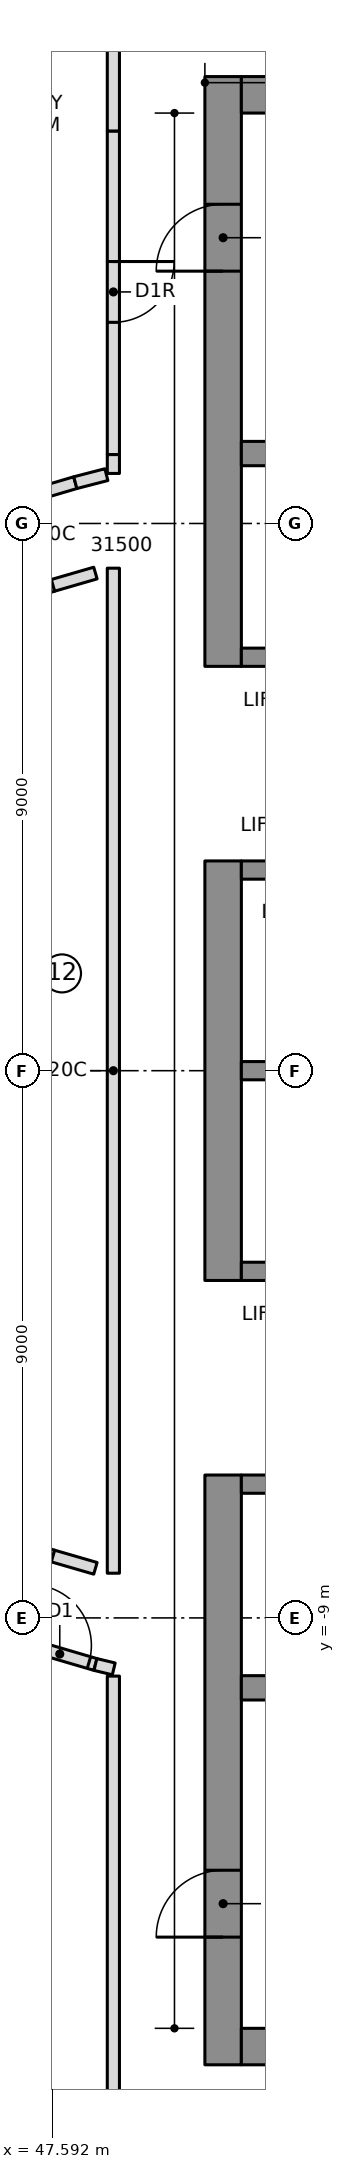
"""IFC4 building model, lengths in metres.
Left out: names, types, materials, properties, quantities, classifications, styles, units other than length and angle.
Written with IfcOpenShell. Run it as: python <this file> out.ifc"""

import sys

from ifc_helpers import new_model, si_unit, direction, frame, frame_2d, origin, place, context, subcontext, project, spatial, rectangle, extrude, element, fill, save


model = new_model("IFC4")
c1 = context("Model", 3, precision=1e-05, world=origin(), true_north=direction((0.0, 1.0)))
c2 = subcontext(c1, "Body", "Model", "MODEL_VIEW")
j1 = project(units=[si_unit("LENGTHUNIT", "METRE"), si_unit("PLANEANGLEUNIT", "RADIAN")], contexts=[c1])
p1 = place(None, origin())
s1 = spatial("IfcSite", under=j1, at=p1, CompositionType="ELEMENT")
p2 = place(p1, origin())
s2 = spatial("IfcBuilding", under=s1, at=p2, CompositionType="ELEMENT")
p3 = place(p2, frame((0.0, 0.0, 224.35)))
s3 = spatial("IfcBuildingStorey", under=s2, at=p3, CompositionType="ELEMENT", Elevation=224.35)
p4 = place(p3, frame((50.4, 6.65, 0.0), z_axis=(0.0, 0.0, 1.0), x_axis=(0.0, 1.0, 0.0)))
e1 = element("IfcWall", 1, at=p4, inside=s3, PredefinedType="SHEAR", context=c2, shape_type="SweptSolid", body=[
    extrude(rectangle(XDim=9.7, YDim=0.6, at=frame_2d((4.85, 0.0))), origin(), (0.0, 0.0, 1.0), 3.55),
])
p5 = place(p4, frame((6.5, 0.0, 0.0)))
e2 = element("IfcOpeningElement", 2, at=p5, cuts=e1, PredefinedType="OPENING", context=c2, shape_type="SweptSolid", body=[
    extrude(rectangle(XDim=1.1, YDim=2.1, at=frame_2d((0.55, 1.05))), frame((0.0, 0.31, 0.0), z_axis=(0.0, -1.0, 0.0), x_axis=(1.0, 0.0, 0.0)), (0.0, 0.0, 1.0), 0.62),
])
p6 = place(p3, frame((50.4, -3.45, 0.0), z_axis=(0.0, 0.0, 1.0), x_axis=(0.0, 1.0, 0.0)))
e3 = element("IfcWall", 3, at=p6, inside=s3, PredefinedType="SHEAR", context=c2, shape_type="SweptSolid", body=[
    extrude(rectangle(XDim=6.9, YDim=0.6, at=frame_2d((3.45, 0.0))), origin(), (0.0, 0.0, 1.0), 3.55),
])
p7 = place(p3, frame((50.4, -16.35, 0.0), z_axis=(0.0, 0.0, 1.0), x_axis=(0.0, 1.0, 0.0)))
e4 = element("IfcWall", 4, at=p7, inside=s3, PredefinedType="SHEAR", context=c2, shape_type="SweptSolid", body=[
    extrude(rectangle(XDim=9.7, YDim=0.6, at=frame_2d((4.85, 0.0))), origin(), (0.0, 0.0, 1.0), 3.55),
])
p8 = place(p7, frame((2.1, 0.0, 0.0)))
e5 = element("IfcOpeningElement", 5, at=p8, cuts=e4, PredefinedType="OPENING", context=c2, shape_type="SweptSolid", body=[
    extrude(rectangle(XDim=1.1, YDim=2.1, at=frame_2d((0.55, 1.05))), frame((0.0, 0.31, 0.0), z_axis=(0.0, -1.0, 0.0), x_axis=(1.0, 0.0, 0.0)), (0.0, 0.0, 1.0), 0.62),
])
for number, where, z_axis, x_axis in (
    (6, (50.7, 16.05, 0.0), (0.0, 0.0, 1.0), (1.0, 0.0, 0.0)),
    (7, (50.7, -16.05, 0.0), (0.0, 0.0, 1.0), (1.0, 0.0, 0.0)),
):
    element("IfcWall", number, at=place(p3, frame(where, z_axis=z_axis, x_axis=x_axis)), inside=s3, PredefinedType="SHEAR", context=c2, shape_type="SweptSolid", body=[
        extrude(rectangle(XDim=13.62, YDim=0.6, at=frame_2d((6.81, 0.0))), origin(), (0.0, 0.0, 1.0), 3.55),
    ])
p9 = place(p3, frame((50.7, 10.15, 0.0), z_axis=(0.0, 0.0, 1.0), x_axis=(1.0, 0.0, 0.0)))
e8 = element("IfcWall", 8, at=p9, inside=s3, PredefinedType="SHEAR", context=c2, shape_type="SweptSolid", body=[
    extrude(rectangle(XDim=13.02, YDim=0.4, at=frame_2d((6.51, 0.0))), origin(), (0.0, 0.0, 1.0), 3.55),
])
p10 = place(p9, frame((0.7, 0.0, 0.0)))
e9 = element("IfcOpeningElement", 9, at=p10, cuts=e8, PredefinedType="OPENING", context=c2, shape_type="SweptSolid", body=[
    extrude(rectangle(XDim=1.1, YDim=2.1, at=frame_2d((0.55, 1.05))), frame((0.0, 0.21, 0.0), z_axis=(0.0, -1.0, 0.0), x_axis=(1.0, 0.0, 0.0)), (0.0, 0.0, 1.0), 0.42),
])
p11 = place(p9, frame((3.5, 0.0, 0.0)))
e10 = element("IfcOpeningElement", 10, at=p11, cuts=e8, PredefinedType="OPENING", context=c2, shape_type="SweptSolid", body=[
    extrude(rectangle(XDim=1.1, YDim=2.1, at=frame_2d((0.55, 1.05))), frame((0.0, 0.21, 0.0), z_axis=(0.0, -1.0, 0.0), x_axis=(1.0, 0.0, 0.0)), (0.0, 0.0, 1.0), 0.42),
])
p12 = place(p3, frame((50.7, -10.15, 0.0), z_axis=(0.0, 0.0, 1.0), x_axis=(1.0, 0.0, 0.0)))
e11 = element("IfcWall", 11, at=p12, inside=s3, PredefinedType="SHEAR", context=c2, shape_type="SweptSolid", body=[
    extrude(rectangle(XDim=13.02, YDim=0.4, at=frame_2d((6.51, 0.0))), origin(), (0.0, 0.0, 1.0), 3.55),
])
p13 = place(p3, frame((50.7, 0.0, 0.0), z_axis=(0.0, 0.0, 1.0), x_axis=(1.0, 0.0, 0.0)))
e12 = element("IfcWall", 12, at=p13, inside=s3, PredefinedType="SHEAR", context=c2, shape_type="SweptSolid", body=[
    extrude(rectangle(XDim=10.9, YDim=0.3, at=frame_2d((5.45, 0.0))), origin(), (0.0, 0.0, 1.0), 3.55),
])
p14 = place(p3, frame((50.7, 3.3, 0.0), z_axis=(0.0, 0.0, 1.0), x_axis=(1.0, 0.0, 0.0)))
e13 = element("IfcWall", 13, at=p14, inside=s3, PredefinedType="SHEAR", context=c2, shape_type="SweptSolid", body=[
    extrude(rectangle(XDim=10.9, YDim=0.3, at=frame_2d((5.45, 0.0))), origin(), (0.0, 0.0, 1.0), 3.55),
])
p15 = place(p14, frame((0.7, 0.0, 0.0)))
e14 = element("IfcOpeningElement", 14, at=p15, cuts=e13, PredefinedType="OPENING", context=c2, shape_type="SweptSolid", body=[
    extrude(rectangle(XDim=1.1, YDim=2.1, at=frame_2d((0.55, 1.05))), frame((0.0, 0.16, 0.0), z_axis=(0.0, -1.0, 0.0), x_axis=(1.0, 0.0, 0.0)), (0.0, 0.0, 1.0), 0.32),
])
p16 = place(p14, frame((3.5, 0.0, 0.0)))
e15 = element("IfcOpeningElement", 15, at=p16, cuts=e13, PredefinedType="OPENING", context=c2, shape_type="SweptSolid", body=[
    extrude(rectangle(XDim=1.1, YDim=2.1, at=frame_2d((0.55, 1.05))), frame((0.0, 0.16, 0.0), z_axis=(0.0, -1.0, 0.0), x_axis=(1.0, 0.0, 0.0)), (0.0, 0.0, 1.0), 0.32),
])
p17 = place(p14, frame((6.4, 0.0, 0.0)))
e16 = element("IfcOpeningElement", 16, at=p17, cuts=e13, PredefinedType="OPENING", context=c2, shape_type="SweptSolid", body=[
    extrude(rectangle(XDim=0.9, YDim=2.1, at=frame_2d((0.45, 1.05))), frame((0.0, 0.16, 0.0), z_axis=(0.0, -1.0, 0.0), x_axis=(1.0, 0.0, 0.0)), (0.0, 0.0, 1.0), 0.32),
])
p18 = place(p14, frame((9.2, 0.0, 0.0)))
e17 = element("IfcOpeningElement", 17, at=p18, cuts=e13, PredefinedType="OPENING", context=c2, shape_type="SweptSolid", body=[
    extrude(rectangle(XDim=0.9, YDim=2.1, at=frame_2d((0.45, 1.05))), frame((0.0, 0.16, 0.0), z_axis=(0.0, -1.0, 0.0), x_axis=(1.0, 0.0, 0.0)), (0.0, 0.0, 1.0), 0.32),
])
p19 = place(p3, frame((50.7, 6.8, 0.0), z_axis=(0.0, 0.0, 1.0), x_axis=(1.0, 0.0, 0.0)))
e18 = element("IfcWall", 18, at=p19, inside=s3, PredefinedType="SHEAR", context=c2, shape_type="SweptSolid", body=[
    extrude(rectangle(XDim=10.9, YDim=0.3, at=frame_2d((5.45, 0.0))), origin(), (0.0, 0.0, 1.0), 3.55),
])
p20 = place(p19, frame((6.4, 0.0, 0.0)))
e19 = element("IfcOpeningElement", 19, at=p20, cuts=e18, PredefinedType="OPENING", context=c2, shape_type="SweptSolid", body=[
    extrude(rectangle(XDim=0.9, YDim=2.1, at=frame_2d((0.45, 1.05))), frame((0.0, 0.16, 0.0), z_axis=(0.0, -1.0, 0.0), x_axis=(1.0, 0.0, 0.0)), (0.0, 0.0, 1.0), 0.32),
])
p21 = place(p19, frame((9.2, 0.0, 0.0)))
e20 = element("IfcOpeningElement", 20, at=p21, cuts=e18, PredefinedType="OPENING", context=c2, shape_type="SweptSolid", body=[
    extrude(rectangle(XDim=0.9, YDim=2.1, at=frame_2d((0.45, 1.05))), frame((0.0, 0.16, 0.0), z_axis=(0.0, -1.0, 0.0), x_axis=(1.0, 0.0, 0.0)), (0.0, 0.0, 1.0), 0.32),
])
p22 = place(p3, frame((50.7, -3.3, 0.0), z_axis=(0.0, 0.0, 1.0), x_axis=(1.0, 0.0, 0.0)))
e21 = element("IfcWall", 21, at=p22, inside=s3, PredefinedType="SHEAR", context=c2, shape_type="SweptSolid", body=[
    extrude(rectangle(XDim=10.9, YDim=0.3, at=frame_2d((5.45, 0.0))), origin(), (0.0, 0.0, 1.0), 3.55),
])
p23 = place(p22, frame((9.1, 0.0, 0.0)))
e22 = element("IfcOpeningElement", 22, at=p23, cuts=e21, PredefinedType="OPENING", context=c2, shape_type="SweptSolid", body=[
    extrude(rectangle(XDim=1.1, YDim=2.1, at=frame_2d((0.55, 1.05))), frame((0.0, 0.16, 0.0), z_axis=(0.0, -1.0, 0.0), x_axis=(1.0, 0.0, 0.0)), (0.0, 0.0, 1.0), 0.32),
])
p24 = place(p3, frame((50.7, -6.8, 0.0), z_axis=(0.0, 0.0, 1.0), x_axis=(1.0, 0.0, 0.0)))
e23 = element("IfcWall", 23, at=p24, inside=s3, PredefinedType="SHEAR", context=c2, shape_type="SweptSolid", body=[
    extrude(rectangle(XDim=10.9, YDim=0.3, at=frame_2d((5.45, 0.0))), origin(), (0.0, 0.0, 1.0), 3.55),
])
p25 = place(p24, frame((6.3, 0.0, 0.0)))
e24 = element("IfcOpeningElement", 24, at=p25, cuts=e23, PredefinedType="OPENING", context=c2, shape_type="SweptSolid", body=[
    extrude(rectangle(XDim=1.1, YDim=2.1, at=frame_2d((0.55, 1.05))), frame((0.0, 0.16, 0.0), z_axis=(0.0, -1.0, 0.0), x_axis=(1.0, 0.0, 0.0)), (0.0, 0.0, 1.0), 0.32),
])
p26 = place(p24, frame((9.1, 0.0, 0.0)))
e25 = element("IfcOpeningElement", 25, at=p26, cuts=e23, PredefinedType="OPENING", context=c2, shape_type="SweptSolid", body=[
    extrude(rectangle(XDim=1.1, YDim=2.1, at=frame_2d((0.55, 1.05))), frame((0.0, 0.16, 0.0), z_axis=(0.0, -1.0, 0.0), x_axis=(1.0, 0.0, 0.0)), (0.0, 0.0, 1.0), 0.32),
])
p27 = place(p24, frame((0.8, 0.0, 0.0)))
e26 = element("IfcOpeningElement", 26, at=p27, cuts=e23, PredefinedType="OPENING", context=c2, shape_type="SweptSolid", body=[
    extrude(rectangle(XDim=0.9, YDim=2.1, at=frame_2d((0.45, 1.05))), frame((0.0, 0.16, 0.0), z_axis=(0.0, -1.0, 0.0), x_axis=(1.0, 0.0, 0.0)), (0.0, 0.0, 1.0), 0.32),
])
p28 = place(p24, frame((3.6, 0.0, 0.0)))
e27 = element("IfcOpeningElement", 27, at=p28, cuts=e23, PredefinedType="OPENING", context=c2, shape_type="SweptSolid", body=[
    extrude(rectangle(XDim=0.9, YDim=2.1, at=frame_2d((0.45, 1.05))), frame((0.0, 0.16, 0.0), z_axis=(0.0, -1.0, 0.0), x_axis=(1.0, 0.0, 0.0)), (0.0, 0.0, 1.0), 0.32),
])
p29 = place(p3, frame((47.969, 9.671, 0.0), z_axis=(0.0, 0.0, 1.0), x_axis=(-0.958867721668, -0.283853293696, 0.0)))
e28 = element("IfcWall", 28, at=p29, inside=s3, PredefinedType="PARTITIONING", context=c2, shape_type="SweptSolid", body=[
    extrude(rectangle(XDim=1.167, YDim=0.2, at=frame_2d((0.583, 0.0))), origin(), (0.0, 0.0, 1.0), 3.25),
])
for number, where, z_axis, x_axis in (
    (29, (46.85, 7.748, 0.0), (0.0, 0.0, 1.0), (0.955, 0.298, 0.0)),
    (30, (47.602, -7.982, 0.0), (0.0, 0.0, 1.0), (-0.955, 0.298, 0.0)),
):
    element("IfcWall", number, at=place(p3, frame(where, z_axis=z_axis, x_axis=x_axis)), inside=s3, PredefinedType="PARTITIONING", context=c2, shape_type="SweptSolid", body=[
        extrude(rectangle(XDim=0.788, YDim=0.2, at=frame_2d((0.394, 0.0))), origin(), (0.0, 0.0, 1.0), 3.25),
    ])
p30 = place(p3, frame((46.85, -9.34, 0.0), z_axis=(0.0, 0.0, 1.0), x_axis=(0.95944263903, -0.281903924079, 0.0)))
e31 = element("IfcWall", 31, at=p30, inside=s3, PredefinedType="PARTITIONING", context=c2, shape_type="SweptSolid", body=[
    extrude(rectangle(XDim=1.511, YDim=0.2, at=frame_2d((0.756, 0.0))), origin(), (0.0, 0.0, 1.0), 3.25),
])
p31 = place(p30, frame((0.4, 0.0, 0.0)))
e32 = element("IfcOpeningElement", 32, at=p31, cuts=e31, PredefinedType="OPENING", context=c2, shape_type="SweptSolid", body=[
    extrude(rectangle(XDim=1.0, YDim=2.1, at=frame_2d((0.5, 1.05))), frame((0.0, 0.11, 0.0), z_axis=(0.0, -1.0, 0.0), x_axis=(1.0, 0.0, 0.0)), (0.0, 0.0, 1.0), 0.22),
])
for number, where, z_axis, x_axis in (
    (33, (47.602, 7.982, 0.0), (0.0, 0.0, 1.0), (0.96, 0.278, 0.0)),
    (34, (48.3, -8.185, 0.0), (0.0, 0.0, 1.0), (-0.96, 0.278, 0.0)),
):
    element("IfcWall", number, at=place(p3, frame(where, z_axis=z_axis, x_axis=x_axis)), inside=s3, PredefinedType="PARTITIONING", context=c2, shape_type="SweptSolid", body=[
        extrude(rectangle(XDim=0.727, YDim=0.2, at=frame_2d((0.363, 0.0))), origin(), (0.0, 0.0, 1.0), 3.25),
    ])
p32 = place(p3, frame((48.595, 15.455, 0.0), z_axis=(0.0, 0.0, 1.0), x_axis=(0.0, -1.0, 0.0)))
e35 = element("IfcWall", 35, at=p32, inside=s3, PredefinedType="PARTITIONING", context=c2, shape_type="SweptSolid", body=[
    extrude(rectangle(XDim=5.322, YDim=0.2, at=frame_2d((2.661, 0.0))), origin(), (0.0, 0.0, 1.0), 3.25),
])
p33 = place(p32, frame((2.147, 0.0, 0.0)))
e36 = element("IfcOpeningElement", 36, at=p33, cuts=e35, PredefinedType="OPENING", context=c2, shape_type="SweptSolid", body=[
    extrude(rectangle(XDim=1.0, YDim=2.1, at=frame_2d((0.5, 1.05))), frame((0.0, 0.11, 0.0), z_axis=(0.0, -1.0, 0.0), x_axis=(1.0, 0.0, 0.0)), (0.0, 0.0, 1.0), 0.22),
])
p34 = place(p3, frame((48.595, 8.265, 0.0), z_axis=(0.0, 0.0, 1.0), x_axis=(0.0, -1.0, 0.0)))
e37 = element("IfcWall", 37, at=p34, inside=s3, PredefinedType="PARTITIONING", context=c2, shape_type="SweptSolid", body=[
    extrude(rectangle(XDim=16.53, YDim=0.2, at=frame_2d((8.265, 0.0))), origin(), (0.0, 0.0, 1.0), 3.25),
])
p35 = place(p3, frame((48.595, 19.927, 0.0), z_axis=(0.0, 0.0, 1.0), x_axis=(0.0, -1.0, 0.0)))
e38 = element("IfcWall", 38, at=p35, inside=s3, PredefinedType="PARTITIONING", context=c2, shape_type="SweptSolid", body=[
    extrude(rectangle(XDim=4.472, YDim=0.2, at=frame_2d((2.236, 0.0))), origin(), (0.0, 0.0, 1.0), 3.25),
])
p36 = place(p3, frame((48.595, 10.133, 0.0), z_axis=(0.0, 0.0, 1.0), x_axis=(0.0, -1.0, 0.0)))
e39 = element("IfcWall", 39, at=p36, inside=s3, PredefinedType="PARTITIONING", context=c2, shape_type="SweptSolid", body=[
    extrude(rectangle(XDim=0.31, YDim=0.2, at=frame_2d((0.155, 0.0))), origin(), (0.0, 0.0, 1.0), 3.25),
])
p37 = place(p3, frame((48.48, 9.803, 0.0), z_axis=(0.0, 0.0, 1.0), x_axis=(-0.968262872428, -0.249934011047, 0.0)))
e40 = element("IfcWall", 40, at=p37, inside=s3, PredefinedType="PARTITIONING", context=c2, shape_type="SweptSolid", body=[
    extrude(rectangle(XDim=0.528, YDim=0.2, at=frame_2d((0.264, 0.0))), origin(), (0.0, 0.0, 1.0), 3.25),
])
p38 = place(p3, frame((48.3, -9.766, 0.0), z_axis=(0.0, 0.0, 1.0), x_axis=(0.972415906571, -0.233253734477, 0.0)))
e41 = element("IfcWall", 41, at=p38, inside=s3, PredefinedType="PARTITIONING", context=c2, shape_type="SweptSolid", body=[
    extrude(rectangle(XDim=0.31, YDim=0.2, at=frame_2d((0.155, 0.0))), origin(), (0.0, 0.0, 1.0), 3.25),
])
p39 = place(p3, frame((48.595, -9.957, 0.0), z_axis=(0.0, 0.0, 1.0), x_axis=(0.0, -1.0, 0.0)))
e42 = element("IfcWall", 42, at=p39, inside=s3, PredefinedType="PARTITIONING", context=c2, shape_type="SweptSolid", body=[
    extrude(rectangle(XDim=9.972, YDim=0.2, at=frame_2d((4.986, 0.0))), origin(), (0.0, 0.0, 1.0), 3.25),
])
p40 = place(p31, origin())
e43 = element("IfcDoor", 43, at=p40, inside=s3, OperationType="SINGLE_SWING_LEFT", PredefinedType="DOOR", context=c2, shape_type="SweptSolid", body=[
    extrude(rectangle(XDim=1.0, YDim=2.1, at=frame_2d((0.5, 1.05))), frame((0.0, 0.025, 0.0), z_axis=(0.0, -1.0, 0.0), x_axis=(1.0, 0.0, 0.0)), (0.0, 0.0, 1.0), 0.05),
])
fill(e32, e43)
p41 = place(p33, origin())
e44 = element("IfcDoor", 44, at=p41, inside=s3, OperationType="SINGLE_SWING_RIGHT", PredefinedType="DOOR", context=c2, shape_type="SweptSolid", body=[
    extrude(rectangle(XDim=1.0, YDim=2.1, at=frame_2d((0.5, 1.05))), frame((0.0, 0.025, 0.0), z_axis=(0.0, -1.0, 0.0), x_axis=(1.0, 0.0, 0.0)), (0.0, 0.0, 1.0), 0.05),
])
fill(e36, e44)
p42 = place(p5, origin())
e45 = element("IfcDoor", 45, at=p42, inside=s3, OperationType="SINGLE_SWING_RIGHT", PredefinedType="DOOR", context=c2, shape_type="SweptSolid", body=[
    extrude(rectangle(XDim=1.1, YDim=2.1, at=frame_2d((0.55, 1.05))), frame((0.0, 0.025, 0.0), z_axis=(0.0, -1.0, 0.0), x_axis=(1.0, 0.0, 0.0)), (0.0, 0.0, 1.0), 0.05),
])
fill(e2, e45)
p43 = place(p8, origin())
e46 = element("IfcDoor", 46, at=p43, inside=s3, OperationType="SINGLE_SWING_RIGHT", PredefinedType="DOOR", context=c2, shape_type="SweptSolid", body=[
    extrude(rectangle(XDim=1.1, YDim=2.1, at=frame_2d((0.55, 1.05))), frame((0.0, 0.025, 0.0), z_axis=(0.0, -1.0, 0.0), x_axis=(1.0, 0.0, 0.0)), (0.0, 0.0, 1.0), 0.05),
])
fill(e5, e46)
save(model, sys.argv[1])
